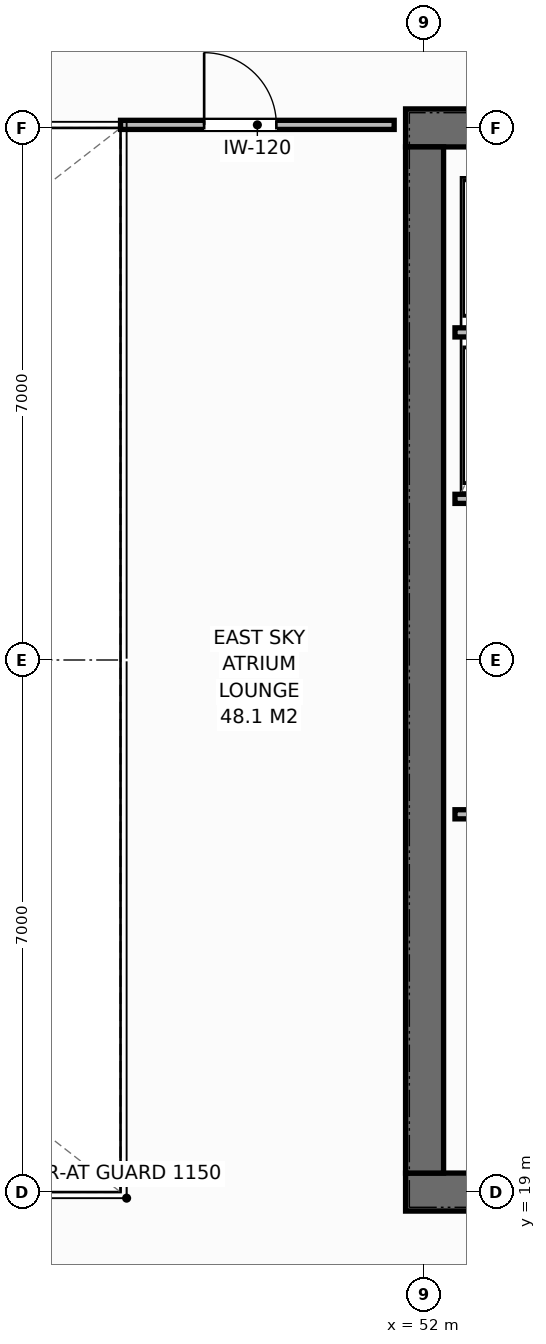
"""IFC4 building model, lengths in metres.
Left out: names, types, materials, properties, quantities, classifications, styles, units other than length and angle.
Written with IfcOpenShell. Run it as: python <this file> out.ifc"""

import sys

from ifc_helpers import new_model, si_unit, direction, frame, frame_2d, origin, place, context, subcontext, project, spatial, rectangle, extrude, element, fill, save


model = new_model("IFC4")
c1 = context("Model", 3, precision=1e-05, world=origin(), true_north=direction((0.0, 1.0)))
c2 = subcontext(c1, "Body", "Model", "MODEL_VIEW")
j1 = project(units=[si_unit("LENGTHUNIT", "METRE"), si_unit("PLANEANGLEUNIT", "RADIAN")], contexts=[c1])
p1 = place(None, origin())
s1 = spatial("IfcSite", under=j1, at=p1, CompositionType="ELEMENT")
p2 = place(p1, origin())
s2 = spatial("IfcBuilding", under=s1, at=p2, CompositionType="ELEMENT")
p3 = place(p2, frame((0.0, 0.0, 302.4)))
s3 = spatial("IfcBuildingStorey", under=s2, at=p3, CompositionType="ELEMENT", Elevation=302.4)
p4 = place(p3, frame((51.75, 19.0, 0.0), z_axis=(0.0, 0.0, 1.0), x_axis=(1.0, 0.0, 0.0)))
e1 = element("IfcWall", 1, at=p4, inside=s3, PredefinedType="SHEAR", context=c2, shape_type="SweptSolid", body=[
    extrude(rectangle(XDim=13.5, YDim=0.5, at=frame_2d((6.75, 0.0))), origin(), (0.0, 0.0, 1.0), 4.0),
])
p5 = place(p4, frame((2.97, 0.0, 0.0)))
e2 = element("IfcOpeningElement", 2, at=p5, cuts=e1, PredefinedType="OPENING", context=c2, shape_type="SweptSolid", body=[
    extrude(rectangle(XDim=1.4, YDim=2.2, at=frame_2d((0.7, 1.1))), frame((0.0, 0.26, 0.0), z_axis=(0.0, -1.0, 0.0), x_axis=(1.0, 0.0, 0.0)), (0.0, 0.0, 1.0), 0.52),
])
p6 = place(p3, frame((51.75, 33.0, 0.0), z_axis=(0.0, 0.0, 1.0), x_axis=(1.0, 0.0, 0.0)))
e3 = element("IfcWall", 3, at=p6, inside=s3, PredefinedType="SHEAR", context=c2, shape_type="SweptSolid", body=[
    extrude(rectangle(XDim=13.5, YDim=0.5, at=frame_2d((6.75, 0.0))), origin(), (0.0, 0.0, 1.0), 4.0),
])
p7 = place(p6, frame((2.97, 0.0, 0.0)))
e4 = element("IfcOpeningElement", 4, at=p7, cuts=e3, PredefinedType="OPENING", context=c2, shape_type="SweptSolid", body=[
    extrude(rectangle(XDim=1.4, YDim=2.2, at=frame_2d((0.7, 1.1))), frame((0.0, 0.26, 0.0), z_axis=(0.0, -1.0, 0.0), x_axis=(1.0, 0.0, 0.0)), (0.0, 0.0, 1.0), 0.52),
])
p8 = place(p6, frame((10.85, 0.0, 0.0)))
e5 = element("IfcOpeningElement", 5, at=p8, cuts=e3, PredefinedType="OPENING", context=c2, shape_type="SweptSolid", body=[
    extrude(rectangle(XDim=0.9, YDim=2.15, at=frame_2d((0.45, 1.075))), frame((0.0, 0.26, 0.0), z_axis=(0.0, -1.0, 0.0), x_axis=(1.0, 0.0, 0.0)), (0.0, 0.0, 1.0), 0.52),
])
p9 = place(p6, frame((5.8, 0.0, 0.0)))
e6 = element("IfcOpeningElement", 6, at=p9, cuts=e3, PredefinedType="OPENING", context=c2, shape_type="SweptSolid", body=[
    extrude(rectangle(XDim=0.9, YDim=2.15, at=frame_2d((0.45, 1.075))), frame((0.0, 0.26, 0.0), z_axis=(0.0, -1.0, 0.0), x_axis=(1.0, 0.0, 0.0)), (0.0, 0.0, 1.0), 0.52),
])
p10 = place(p6, frame((8.2, 0.0, 0.0)))
e7 = element("IfcOpeningElement", 7, at=p10, cuts=e3, PredefinedType="OPENING", context=c2, shape_type="SweptSolid", body=[
    extrude(rectangle(XDim=0.95, YDim=2.15, at=frame_2d((0.475, 1.075))), frame((0.0, 0.26, 0.0), z_axis=(0.0, -1.0, 0.0), x_axis=(1.0, 0.0, 0.0)), (0.0, 0.0, 1.0), 0.52),
])
p11 = place(p3, frame((52.0, 19.25, 0.0), z_axis=(0.0, 0.0, 1.0), x_axis=(0.0, 1.0, 0.0)))
e8 = element("IfcWall", 8, at=p11, inside=s3, PredefinedType="SHEAR", context=c2, shape_type="SweptSolid", body=[
    extrude(rectangle(XDim=13.5, YDim=0.5, at=frame_2d((6.75, 0.0))), origin(), (0.0, 0.0, 1.0), 4.0),
])
for number, where, z_axis, x_axis in (
    (9, (52.4, 23.97, 0.0), (0.0, 0.0, 1.0), (1.0, 0.0, 0.0)),
    (10, (52.4, 28.12, 0.0), (0.0, 0.0, 1.0), (1.0, 0.0, 0.0)),
    (11, (52.4, 30.31, 0.0), (0.0, 0.0, 1.0), (1.0, 0.0, 0.0)),
):
    element("IfcWall", number, at=place(p3, frame(where, z_axis=z_axis, x_axis=x_axis)), inside=s3, PredefinedType="PARTITIONING", context=c2, shape_type="SweptSolid", body=[
        extrude(rectangle(XDim=2.2, YDim=0.12, at=frame_2d((1.1, 0.0))), origin(), (0.0, 0.0, 1.0), 3.788),
    ])
p12 = place(p3, frame((48.0, 33.04, 0.0), z_axis=(0.0, 0.0, 1.0), x_axis=(1.0, 0.0, 0.0)))
e12 = element("IfcWall", 12, at=p12, inside=s3, PredefinedType="PARTITIONING", context=c2, shape_type="SweptSolid", body=[
    extrude(rectangle(XDim=3.6, YDim=0.12, at=frame_2d((1.8, 0.0))), origin(), (0.0, 0.0, 1.0), 3.528),
])
p13 = place(p12, frame((1.1, 0.0, 0.0)))
e13 = element("IfcOpeningElement", 13, at=p13, cuts=e12, PredefinedType="OPENING", context=c2, shape_type="SweptSolid", body=[
    extrude(rectangle(XDim=0.95, YDim=2.15, at=frame_2d((0.475, 1.075))), frame((0.0, 0.07, 0.0), z_axis=(0.0, -1.0, 0.0), x_axis=(1.0, 0.0, 0.0)), (0.0, 0.0, 1.0), 0.14),
])
p14 = place(p13, origin())
e14 = element("IfcDoor", 14, at=p14, inside=s3, OperationType="SINGLE_SWING_LEFT", PredefinedType="DOOR", context=c2, shape_type="SweptSolid", body=[
    extrude(rectangle(XDim=0.95, YDim=2.15, at=frame_2d((0.475, 1.075))), frame((0.0, 0.025, 0.0), z_axis=(0.0, -1.0, 0.0), x_axis=(1.0, 0.0, 0.0)), (0.0, 0.0, 1.0), 0.05),
])
fill(e13, e14)
save(model, sys.argv[1])
